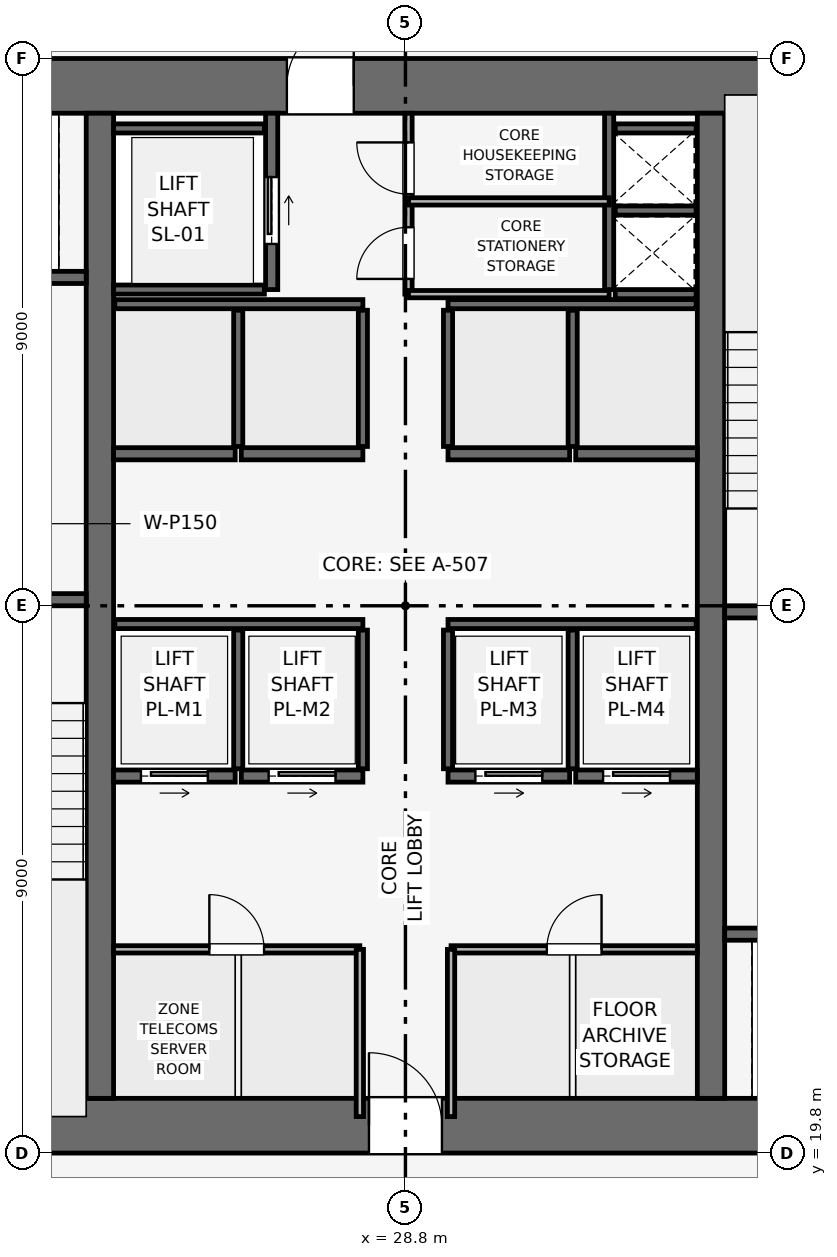
"""IFC4 building model, lengths in metres.
Left out: names, types, materials, properties, quantities, classifications, styles, units other than length and angle.
Written with IfcOpenShell. Run it as: python <this file> out.ifc"""

import sys

from ifc_helpers import new_model, si_unit, direction, frame, frame_2d, origin, place, context, subcontext, project, spatial, rectangle, extrude, element, fill, save


model = new_model("IFC4")
c1 = context("Model", 3, precision=1e-05, world=origin(), true_north=direction((0.0, 1.0)))
c2 = subcontext(c1, "Body", "Model", "MODEL_VIEW")
j1 = project(units=[si_unit("LENGTHUNIT", "METRE"), si_unit("PLANEANGLEUNIT", "RADIAN")], contexts=[c1])
p1 = place(None, origin())
s1 = spatial("IfcSite", under=j1, at=p1, CompositionType="ELEMENT")
p2 = place(p1, origin())
s2 = spatial("IfcBuilding", under=s1, at=p2, CompositionType="ELEMENT")
p3 = place(p2, frame((0.0, 0.0, 153.3)))
s3 = spatial("IfcBuildingStorey", under=s2, at=p3, CompositionType="ELEMENT", Elevation=153.3)
p4 = place(p3, frame((19.8, 20.25, 0.0), z_axis=(0.0, 0.0, 1.0), x_axis=(1.0, 0.0, 0.0)))
e1 = element("IfcWall", 1, at=p4, inside=s3, PredefinedType="SHEAR", context=c2, shape_type="SweptSolid", body=[
    extrude(rectangle(XDim=18.0, YDim=0.9, at=frame_2d((9.0, 0.0))), origin(), (0.0, 0.0, 1.0), 3.75),
])
p5 = place(p4, frame((8.4, 0.0, 0.0)))
e2 = element("IfcOpeningElement", 2, at=p5, cuts=e1, PredefinedType="OPENING", context=c2, shape_type="SweptSolid", body=[
    extrude(rectangle(XDim=1.2, YDim=2.2, at=frame_2d((0.6, 1.1))), frame((0.0, 0.46, 0.0), z_axis=(0.0, -1.0, 0.0), x_axis=(1.0, 0.0, 0.0)), (0.0, 0.0, 1.0), 0.92),
])
p6 = place(p3, frame((19.8, 37.35, 0.0), z_axis=(0.0, 0.0, 1.0), x_axis=(1.0, 0.0, 0.0)))
e3 = element("IfcWall", 3, at=p6, inside=s3, PredefinedType="SHEAR", context=c2, shape_type="SweptSolid", body=[
    extrude(rectangle(XDim=18.0, YDim=0.9, at=frame_2d((9.0, 0.0))), origin(), (0.0, 0.0, 1.0), 3.75),
])
p7 = place(p6, frame((7.05, 0.0, 0.0)))
e4 = element("IfcOpeningElement", 4, at=p7, cuts=e3, PredefinedType="OPENING", context=c2, shape_type="SweptSolid", body=[
    extrude(rectangle(XDim=1.1, YDim=2.15, at=frame_2d((0.55, 1.075))), frame((0.0, 0.46, 0.0), z_axis=(0.0, -1.0, 0.0), x_axis=(1.0, 0.0, 0.0)), (0.0, 0.0, 1.0), 0.92),
])
for number, where, z_axis, x_axis in (
    (5, (23.775, 20.7, 0.0), (0.0, 0.0, 1.0), (0.0, 1.0, 0.0)),
    (6, (33.825, 20.7, 0.0), (0.0, 0.0, 1.0), (0.0, 1.0, 0.0)),
):
    element("IfcWall", number, at=place(p3, frame(where, z_axis=z_axis, x_axis=x_axis)), inside=s3, PredefinedType="SHEAR", context=c2, shape_type="SweptSolid", body=[
        extrude(rectangle(XDim=16.2, YDim=0.45, at=frame_2d((8.1, 0.0))), origin(), (0.0, 0.0, 1.0), 3.75),
    ])
p8 = place(p3, frame((20.4, 28.9, 0.0), z_axis=(0.0, 0.0, 1.0), x_axis=(1.0, 0.0, 0.0)))
e7 = element("IfcWall", 7, at=p8, inside=s3, PredefinedType="SHEAR", context=c2, shape_type="SweptSolid", body=[
    extrude(rectangle(XDim=3.15, YDim=0.2, at=frame_2d((1.575, 0.0))), origin(), (0.0, 0.0, 1.0), 3.495),
])
p9 = place(p8, frame((0.8, 0.0, 0.0)))
e8 = element("IfcOpeningElement", 8, at=p9, cuts=e7, PredefinedType="OPENING", context=c2, shape_type="SweptSolid", body=[
    extrude(rectangle(XDim=1.0, YDim=2.1, at=frame_2d((0.5, 1.05))), frame((0.0, 0.11, 0.0), z_axis=(0.0, -1.0, 0.0), x_axis=(1.0, 0.0, 0.0)), (0.0, 0.0, 1.0), 0.22),
])
p10 = place(p3, frame((34.05, 28.7, 0.0), z_axis=(0.0, 0.0, 1.0), x_axis=(1.0, 0.0, 0.0)))
e9 = element("IfcWall", 9, at=p10, inside=s3, PredefinedType="SHEAR", context=c2, shape_type="SweptSolid", body=[
    extrude(rectangle(XDim=3.15, YDim=0.2, at=frame_2d((1.575, 0.0))), origin(), (0.0, 0.0, 1.0), 3.495),
])
p11 = place(p10, frame((0.8, 0.0, 0.0)))
e10 = element("IfcOpeningElement", 10, at=p11, cuts=e9, PredefinedType="OPENING", context=c2, shape_type="SweptSolid", body=[
    extrude(rectangle(XDim=1.0, YDim=2.1, at=frame_2d((0.5, 1.05))), frame((0.0, 0.11, 0.0), z_axis=(0.0, -1.0, 0.0), x_axis=(1.0, 0.0, 0.0)), (0.0, 0.0, 1.0), 0.22),
])
p12 = place(p3, frame((32.15, 34.0, 0.0), z_axis=(0.0, 0.0, 1.0), x_axis=(0.0, 1.0, 0.0)))
e11 = element("IfcWall", 11, at=p12, inside=s3, PredefinedType="SHEAR", context=c2, shape_type="SweptSolid", body=[
    extrude(rectangle(XDim=2.9, YDim=0.15, at=frame_2d((1.45, 0.0))), origin(), (0.0, 0.0, 1.0), 3.495),
])
for number, where, z_axis, x_axis in (
    (12, (32.25, 33.925, 0.0), (0.0, 0.0, 1.0), (1.0, 0.0, 0.0)),
    (13, (32.25, 35.3, 0.0), (0.0, 0.0, 1.0), (1.0, 0.0, 0.0)),
):
    element("IfcWall", number, at=place(p3, frame(where, z_axis=z_axis, x_axis=x_axis)), inside=s3, PredefinedType="SHEAR", context=c2, shape_type="SweptSolid", body=[
        extrude(rectangle(XDim=1.33, YDim=0.15, at=frame_2d((0.665, 0.0))), origin(), (0.0, 0.0, 1.0), 3.495),
    ])
p13 = place(p3, frame((20.5, 34.2, 0.0), z_axis=(0.0, 0.0, 1.0), x_axis=(1.0, 0.0, 0.0)))
e14 = element("IfcWall", 14, at=p13, inside=s3, PredefinedType="SHEAR", context=c2, shape_type="SweptSolid", body=[
    extrude(rectangle(XDim=3.05, YDim=0.2, at=frame_2d((1.525, 0.0))), origin(), (0.0, 0.0, 1.0), 3.495),
])
p14 = place(p13, frame((0.75, 0.0, 0.0)))
e15 = element("IfcOpeningElement", 15, at=p14, cuts=e14, PredefinedType="OPENING", context=c2, shape_type="SweptSolid", body=[
    extrude(rectangle(XDim=1.1, YDim=2.15, at=frame_2d((0.55, 1.075))), frame((0.0, 0.11, 0.0), z_axis=(0.0, -1.0, 0.0), x_axis=(1.0, 0.0, 0.0)), (0.0, 0.0, 1.0), 0.22),
])
p15 = place(p3, frame((34.05, 23.4, 0.0), z_axis=(0.0, 0.0, 1.0), x_axis=(1.0, 0.0, 0.0)))
e16 = element("IfcWall", 16, at=p15, inside=s3, PredefinedType="SHEAR", context=c2, shape_type="SweptSolid", body=[
    extrude(rectangle(XDim=3.05, YDim=0.2, at=frame_2d((1.525, 0.0))), origin(), (0.0, 0.0, 1.0), 3.495),
])
p16 = place(p15, frame((1.2, 0.0, 0.0)))
e17 = element("IfcOpeningElement", 17, at=p16, cuts=e16, PredefinedType="OPENING", context=c2, shape_type="SweptSolid", body=[
    extrude(rectangle(XDim=1.1, YDim=2.15, at=frame_2d((0.55, 1.075))), frame((0.0, 0.11, 0.0), z_axis=(0.0, -1.0, 0.0), x_axis=(1.0, 0.0, 0.0)), (0.0, 0.0, 1.0), 0.22),
])
p17 = place(p3, frame((26.6, 34.0, 0.0), z_axis=(0.0, 0.0, 1.0), x_axis=(0.0, 1.0, 0.0)))
e18 = element("IfcWall", 18, at=p17, inside=s3, PredefinedType="SHEAR", context=c2, shape_type="SweptSolid", body=[
    extrude(rectangle(XDim=2.9, YDim=0.2, at=frame_2d((1.45, 0.0))), origin(), (0.0, 0.0, 1.0), 3.495),
])
p18 = place(p17, frame((0.75, 0.0, 0.0)))
e19 = element("IfcOpeningElement", 19, at=p18, cuts=e18, PredefinedType="OPENING", context=c2, shape_type="SweptSolid", body=[
    extrude(rectangle(XDim=1.1, YDim=2.15, at=frame_2d((0.55, 1.075))), frame((0.0, 0.11, 0.0), z_axis=(0.0, -1.0, 0.0), x_axis=(1.0, 0.0, 0.0)), (0.0, 0.0, 1.0), 0.22),
])
for number, where, z_axis, x_axis in (
    (20, (24.0, 34.0, 0.0), (0.0, 0.0, 1.0), (1.0, 0.0, 0.0)),
    (21, (24.0, 36.65, 0.0), (0.0, 0.0, 1.0), (1.0, 0.0, 0.0)),
):
    element("IfcWall", number, at=place(p3, frame(where, z_axis=z_axis, x_axis=x_axis)), inside=s3, PredefinedType="SHEAR", context=c2, shape_type="SweptSolid", body=[
        extrude(rectangle(XDim=2.48, YDim=0.15, at=frame_2d((1.24, 0.0))), origin(), (0.0, 0.0, 1.0), 3.495),
    ])
p19 = place(p3, frame((24.0, 26.0, 0.0), z_axis=(0.0, 0.0, 1.0), x_axis=(1.0, 0.0, 0.0)))
e22 = element("IfcWall", 22, at=p19, inside=s3, PredefinedType="SHEAR", context=c2, shape_type="SweptSolid", body=[
    extrude(rectangle(XDim=2.0, YDim=0.2, at=frame_2d((1.0, 0.0))), origin(), (0.0, 0.0, 1.0), 3.495),
])
p20 = place(p19, frame((0.45, 0.0, 0.0)))
e23 = element("IfcOpeningElement", 23, at=p20, cuts=e22, PredefinedType="OPENING", context=c2, shape_type="SweptSolid", body=[
    extrude(rectangle(XDim=1.1, YDim=2.15, at=frame_2d((0.55, 1.075))), frame((0.0, 0.11, 0.0), z_axis=(0.0, -1.0, 0.0), x_axis=(1.0, 0.0, 0.0)), (0.0, 0.0, 1.0), 0.22),
])
p21 = place(p3, frame((26.1, 26.0, 0.0), z_axis=(0.0, 0.0, 1.0), x_axis=(1.0, 0.0, 0.0)))
e24 = element("IfcWall", 24, at=p21, inside=s3, PredefinedType="SHEAR", context=c2, shape_type="SweptSolid", body=[
    extrude(rectangle(XDim=2.0, YDim=0.2, at=frame_2d((1.0, 0.0))), origin(), (0.0, 0.0, 1.0), 3.495),
])
p22 = place(p21, frame((0.45, 0.0, 0.0)))
e25 = element("IfcOpeningElement", 25, at=p22, cuts=e24, PredefinedType="OPENING", context=c2, shape_type="SweptSolid", body=[
    extrude(rectangle(XDim=1.1, YDim=2.15, at=frame_2d((0.55, 1.075))), frame((0.0, 0.11, 0.0), z_axis=(0.0, -1.0, 0.0), x_axis=(1.0, 0.0, 0.0)), (0.0, 0.0, 1.0), 0.22),
])
p23 = place(p3, frame((29.5, 26.0, 0.0), z_axis=(0.0, 0.0, 1.0), x_axis=(1.0, 0.0, 0.0)))
e26 = element("IfcWall", 26, at=p23, inside=s3, PredefinedType="SHEAR", context=c2, shape_type="SweptSolid", body=[
    extrude(rectangle(XDim=2.0, YDim=0.2, at=frame_2d((1.0, 0.0))), origin(), (0.0, 0.0, 1.0), 3.495),
])
p24 = place(p23, frame((0.45, 0.0, 0.0)))
e27 = element("IfcOpeningElement", 27, at=p24, cuts=e26, PredefinedType="OPENING", context=c2, shape_type="SweptSolid", body=[
    extrude(rectangle(XDim=1.1, YDim=2.15, at=frame_2d((0.55, 1.075))), frame((0.0, 0.11, 0.0), z_axis=(0.0, -1.0, 0.0), x_axis=(1.0, 0.0, 0.0)), (0.0, 0.0, 1.0), 0.22),
])
p25 = place(p3, frame((31.6, 26.0, 0.0), z_axis=(0.0, 0.0, 1.0), x_axis=(1.0, 0.0, 0.0)))
e28 = element("IfcWall", 28, at=p25, inside=s3, PredefinedType="SHEAR", context=c2, shape_type="SweptSolid", body=[
    extrude(rectangle(XDim=2.0, YDim=0.2, at=frame_2d((1.0, 0.0))), origin(), (0.0, 0.0, 1.0), 3.495),
])
p26 = place(p25, frame((0.45, 0.0, 0.0)))
e29 = element("IfcOpeningElement", 29, at=p26, cuts=e28, PredefinedType="OPENING", context=c2, shape_type="SweptSolid", body=[
    extrude(rectangle(XDim=1.1, YDim=2.15, at=frame_2d((0.55, 1.075))), frame((0.0, 0.11, 0.0), z_axis=(0.0, -1.0, 0.0), x_axis=(1.0, 0.0, 0.0)), (0.0, 0.0, 1.0), 0.22),
])
for number, where, z_axis, x_axis in (
    (30, (24.0, 31.3, 0.0), (0.0, 0.0, 1.0), (1.0, 0.0, 0.0)),
    (31, (26.1, 31.3, 0.0), (0.0, 0.0, 1.0), (1.0, 0.0, 0.0)),
    (32, (29.5, 31.3, 0.0), (0.0, 0.0, 1.0), (1.0, 0.0, 0.0)),
    (33, (31.6, 31.3, 0.0), (0.0, 0.0, 1.0), (1.0, 0.0, 0.0)),
):
    element("IfcWall", number, at=place(p3, frame(where, z_axis=z_axis, x_axis=x_axis)), inside=s3, PredefinedType="SHEAR", context=c2, shape_type="SweptSolid", body=[
        extrude(rectangle(XDim=2.0, YDim=0.2, at=frame_2d((1.0, 0.0))), origin(), (0.0, 0.0, 1.0), 3.495),
    ])
p27 = place(p3, frame((32.25, 36.65, 0.0), z_axis=(0.0, 0.0, 1.0), x_axis=(1.0, 0.0, 0.0)))
e34 = element("IfcWall", 34, at=p27, inside=s3, PredefinedType="SHEAR", context=c2, shape_type="SweptSolid", body=[
    extrude(rectangle(XDim=1.33, YDim=0.15, at=frame_2d((0.665, 0.0))), origin(), (0.0, 0.0, 1.0), 3.495),
])
for number, where, z_axis, x_axis in (
    (35, (24.02, 28.5, 0.0), (0.0, 0.0, 1.0), (1.0, 0.0, 0.0)),
    (36, (29.5, 28.5, 0.0), (0.0, 0.0, 1.0), (1.0, 0.0, 0.0)),
):
    element("IfcWall", number, at=place(p3, frame(where, z_axis=z_axis, x_axis=x_axis)), inside=s3, PredefinedType="SHEAR", context=c2, shape_type="SweptSolid", body=[
        extrude(rectangle(XDim=4.08, YDim=0.15, at=frame_2d((2.04, 0.0))), origin(), (0.0, 0.0, 1.0), 3.495),
    ])
for number, where, z_axis, x_axis in (
    (37, (26.05, 26.12, 0.0), (0.0, 0.0, 1.0), (0.0, 1.0, 0.0)),
    (38, (28.1, 26.12, 0.0), (0.0, 0.0, 1.0), (0.0, 1.0, 0.0)),
    (39, (29.5, 26.12, 0.0), (0.0, 0.0, 1.0), (0.0, 1.0, 0.0)),
    (40, (31.55, 26.12, 0.0), (0.0, 0.0, 1.0), (0.0, 1.0, 0.0)),
):
    element("IfcWall", number, at=place(p3, frame(where, z_axis=z_axis, x_axis=x_axis)), inside=s3, PredefinedType="SHEAR", context=c2, shape_type="SweptSolid", body=[
        extrude(rectangle(XDim=2.28, YDim=0.15, at=frame_2d((1.14, 0.0))), origin(), (0.0, 0.0, 1.0), 3.495),
    ])
for number, where, z_axis, x_axis in (
    (41, (24.02, 33.76, 0.0), (0.0, 0.0, 1.0), (1.0, 0.0, 0.0)),
    (42, (29.5, 33.76, 0.0), (0.0, 0.0, 1.0), (1.0, 0.0, 0.0)),
):
    element("IfcWall", number, at=place(p3, frame(where, z_axis=z_axis, x_axis=x_axis)), inside=s3, PredefinedType="SHEAR", context=c2, shape_type="SweptSolid", body=[
        extrude(rectangle(XDim=4.08, YDim=0.15, at=frame_2d((2.04, 0.0))), origin(), (0.0, 0.0, 1.0), 3.495),
    ])
for number, where, z_axis, x_axis in (
    (43, (26.05, 31.42, 0.0), (0.0, 0.0, 1.0), (0.0, 1.0, 0.0)),
    (44, (28.1, 31.42, 0.0), (0.0, 0.0, 1.0), (0.0, 1.0, 0.0)),
    (45, (29.5, 31.42, 0.0), (0.0, 0.0, 1.0), (0.0, 1.0, 0.0)),
    (46, (31.55, 31.42, 0.0), (0.0, 0.0, 1.0), (0.0, 1.0, 0.0)),
):
    element("IfcWall", number, at=place(p3, frame(where, z_axis=z_axis, x_axis=x_axis)), inside=s3, PredefinedType="SHEAR", context=c2, shape_type="SweptSolid", body=[
        extrude(rectangle(XDim=2.24, YDim=0.15, at=frame_2d((1.12, 0.0))), origin(), (0.0, 0.0, 1.0), 3.495),
    ])
p28 = place(p3, frame((28.85, 33.925, 0.0), z_axis=(0.0, 0.0, 1.0), x_axis=(0.0, 1.0, 0.0)))
e47 = element("IfcWall", 47, at=p28, inside=s3, PredefinedType="PARTITIONING", context=c2, shape_type="SweptSolid", body=[
    extrude(rectangle(XDim=2.975, YDim=0.12, at=frame_2d((1.487, 0.0))), origin(), (0.0, 0.0, 1.0), 3.495),
])
p29 = place(p28, frame((0.25, 0.0, 0.0)))
e48 = element("IfcOpeningElement", 48, at=p29, cuts=e47, PredefinedType="OPENING", context=c2, shape_type="SweptSolid", body=[
    extrude(rectangle(XDim=0.85, YDim=2.1, at=frame_2d((0.425, 1.05))), frame((0.0, 0.07, 0.0), z_axis=(0.0, -1.0, 0.0), x_axis=(1.0, 0.0, 0.0)), (0.0, 0.0, 1.0), 0.14),
])
p30 = place(p28, frame((1.645, 0.0, 0.0)))
e49 = element("IfcOpeningElement", 49, at=p30, cuts=e47, PredefinedType="OPENING", context=c2, shape_type="SweptSolid", body=[
    extrude(rectangle(XDim=0.85, YDim=2.1, at=frame_2d((0.425, 1.05))), frame((0.0, 0.07, 0.0), z_axis=(0.0, -1.0, 0.0), x_axis=(1.0, 0.0, 0.0)), (0.0, 0.0, 1.0), 0.14),
])
for number, where, z_axis, x_axis in (
    (50, (28.85, 35.45, 0.0), (0.0, 0.0, 1.0), (1.0, 0.0, 0.0)),
    (51, (28.85, 33.925, 0.0), (0.0, 0.0, 1.0), (1.0, 0.0, 0.0)),
):
    element("IfcWall", number, at=place(p3, frame(where, z_axis=z_axis, x_axis=x_axis)), inside=s3, PredefinedType="PARTITIONING", context=c2, shape_type="SweptSolid", body=[
        extrude(rectangle(XDim=3.3, YDim=0.12, at=frame_2d((1.65, 0.0))), origin(), (0.0, 0.0, 1.0), 3.495),
    ])
p31 = place(p3, frame((24.0, 23.15, 0.0), z_axis=(0.0, 0.0, 1.0), x_axis=(1.0, 0.0, 0.0)))
e52 = element("IfcWall", 52, at=p31, inside=s3, PredefinedType="PARTITIONING", context=c2, shape_type="SweptSolid", body=[
    extrude(rectangle(XDim=4.05, YDim=0.12, at=frame_2d((2.025, 0.0))), origin(), (0.0, 0.0, 1.0), 3.495),
])
p32 = place(p31, frame((1.575, 0.0, 0.0)))
e53 = element("IfcOpeningElement", 53, at=p32, cuts=e52, PredefinedType="OPENING", context=c2, shape_type="SweptSolid", body=[
    extrude(rectangle(XDim=0.9, YDim=2.1, at=frame_2d((0.45, 1.05))), frame((0.0, 0.07, 0.0), z_axis=(0.0, -1.0, 0.0), x_axis=(1.0, 0.0, 0.0)), (0.0, 0.0, 1.0), 0.14),
])
p33 = place(p3, frame((28.05, 20.4, 0.0), z_axis=(0.0, 0.0, 1.0), x_axis=(0.0, 1.0, 0.0)))
e54 = element("IfcWall", 54, at=p33, inside=s3, PredefinedType="PARTITIONING", context=c2, shape_type="SweptSolid", body=[
    extrude(rectangle(XDim=2.75, YDim=0.12, at=frame_2d((1.375, 0.0))), origin(), (0.0, 0.0, 1.0), 3.495),
])
p34 = place(p3, frame((29.55, 23.15, 0.0), z_axis=(0.0, 0.0, 1.0), x_axis=(1.0, 0.0, 0.0)))
e55 = element("IfcWall", 55, at=p34, inside=s3, PredefinedType="PARTITIONING", context=c2, shape_type="SweptSolid", body=[
    extrude(rectangle(XDim=4.05, YDim=0.12, at=frame_2d((2.025, 0.0))), origin(), (0.0, 0.0, 1.0), 3.495),
])
p35 = place(p34, frame((1.575, 0.0, 0.0)))
e56 = element("IfcOpeningElement", 56, at=p35, cuts=e55, PredefinedType="OPENING", context=c2, shape_type="SweptSolid", body=[
    extrude(rectangle(XDim=0.9, YDim=2.1, at=frame_2d((0.45, 1.05))), frame((0.0, 0.07, 0.0), z_axis=(0.0, -1.0, 0.0), x_axis=(1.0, 0.0, 0.0)), (0.0, 0.0, 1.0), 0.14),
])
p36 = place(p3, frame((29.55, 20.4, 0.0), z_axis=(0.0, 0.0, 1.0), x_axis=(0.0, 1.0, 0.0)))
e57 = element("IfcWall", 57, at=p36, inside=s3, PredefinedType="PARTITIONING", context=c2, shape_type="SweptSolid", body=[
    extrude(rectangle(XDim=2.75, YDim=0.12, at=frame_2d((1.375, 0.0))), origin(), (0.0, 0.0, 1.0), 3.495),
])
p37 = place(p18, origin())
e58 = element("IfcDoor", 58, at=p37, inside=s3, OperationType="SLIDING_TO_RIGHT", PredefinedType="DOOR", context=c2, shape_type="SweptSolid", body=[
    extrude(rectangle(XDim=1.1, YDim=2.15, at=frame_2d((0.55, 1.075))), frame((0.0, 0.025, 0.0), z_axis=(0.0, -1.0, 0.0), x_axis=(1.0, 0.0, 0.0)), (0.0, 0.0, 1.0), 0.05),
])
fill(e19, e58)
p38 = place(p20, origin())
e59 = element("IfcDoor", 59, at=p38, inside=s3, OperationType="SLIDING_TO_RIGHT", PredefinedType="DOOR", context=c2, shape_type="SweptSolid", body=[
    extrude(rectangle(XDim=1.1, YDim=2.15, at=frame_2d((0.55, 1.075))), frame((0.0, 0.025, 0.0), z_axis=(0.0, -1.0, 0.0), x_axis=(1.0, 0.0, 0.0)), (0.0, 0.0, 1.0), 0.05),
])
fill(e23, e59)
p39 = place(p22, origin())
e60 = element("IfcDoor", 60, at=p39, inside=s3, OperationType="SLIDING_TO_RIGHT", PredefinedType="DOOR", context=c2, shape_type="SweptSolid", body=[
    extrude(rectangle(XDim=1.1, YDim=2.15, at=frame_2d((0.55, 1.075))), frame((0.0, 0.025, 0.0), z_axis=(0.0, -1.0, 0.0), x_axis=(1.0, 0.0, 0.0)), (0.0, 0.0, 1.0), 0.05),
])
fill(e25, e60)
p40 = place(p24, origin())
e61 = element("IfcDoor", 61, at=p40, inside=s3, OperationType="SLIDING_TO_RIGHT", PredefinedType="DOOR", context=c2, shape_type="SweptSolid", body=[
    extrude(rectangle(XDim=1.1, YDim=2.15, at=frame_2d((0.55, 1.075))), frame((0.0, 0.025, 0.0), z_axis=(0.0, -1.0, 0.0), x_axis=(1.0, 0.0, 0.0)), (0.0, 0.0, 1.0), 0.05),
])
fill(e27, e61)
p41 = place(p26, origin())
e62 = element("IfcDoor", 62, at=p41, inside=s3, OperationType="SLIDING_TO_RIGHT", PredefinedType="DOOR", context=c2, shape_type="SweptSolid", body=[
    extrude(rectangle(XDim=1.1, YDim=2.15, at=frame_2d((0.55, 1.075))), frame((0.0, 0.025, 0.0), z_axis=(0.0, -1.0, 0.0), x_axis=(1.0, 0.0, 0.0)), (0.0, 0.0, 1.0), 0.05),
])
fill(e29, e62)
p42 = place(p29, origin())
e63 = element("IfcDoor", 63, at=p42, inside=s3, OperationType="SINGLE_SWING_LEFT", PredefinedType="DOOR", context=c2, shape_type="SweptSolid", body=[
    extrude(rectangle(XDim=0.85, YDim=2.1, at=frame_2d((0.425, 1.05))), frame((0.0, 0.025, 0.0), z_axis=(0.0, -1.0, 0.0), x_axis=(1.0, 0.0, 0.0)), (0.0, 0.0, 1.0), 0.05),
])
fill(e48, e63)
p43 = place(p30, origin())
e64 = element("IfcDoor", 64, at=p43, inside=s3, OperationType="SINGLE_SWING_RIGHT", PredefinedType="DOOR", context=c2, shape_type="SweptSolid", body=[
    extrude(rectangle(XDim=0.85, YDim=2.1, at=frame_2d((0.425, 1.05))), frame((0.0, 0.025, 0.0), z_axis=(0.0, -1.0, 0.0), x_axis=(1.0, 0.0, 0.0)), (0.0, 0.0, 1.0), 0.05),
])
fill(e49, e64)
p44 = place(p32, origin())
e65 = element("IfcDoor", 65, at=p44, inside=s3, OperationType="SINGLE_SWING_LEFT", PredefinedType="DOOR", context=c2, shape_type="SweptSolid", body=[
    extrude(rectangle(XDim=0.9, YDim=2.1, at=frame_2d((0.45, 1.05))), frame((0.0, 0.025, 0.0), z_axis=(0.0, -1.0, 0.0), x_axis=(1.0, 0.0, 0.0)), (0.0, 0.0, 1.0), 0.05),
])
fill(e53, e65)
p45 = place(p35, origin())
e66 = element("IfcDoor", 66, at=p45, inside=s3, OperationType="SINGLE_SWING_RIGHT", PredefinedType="DOOR", context=c2, shape_type="SweptSolid", body=[
    extrude(rectangle(XDim=0.9, YDim=2.1, at=frame_2d((0.45, 1.05))), frame((0.0, 0.025, 0.0), z_axis=(0.0, -1.0, 0.0), x_axis=(1.0, 0.0, 0.0)), (0.0, 0.0, 1.0), 0.05),
])
fill(e56, e66)
p46 = place(p5, origin())
e67 = element("IfcDoor", 67, at=p46, inside=s3, OperationType="SINGLE_SWING_LEFT", PredefinedType="DOOR", context=c2, shape_type="SweptSolid", body=[
    extrude(rectangle(XDim=1.2, YDim=2.2, at=frame_2d((0.6, 1.1))), frame((0.0, 0.025, 0.0), z_axis=(0.0, -1.0, 0.0), x_axis=(1.0, 0.0, 0.0)), (0.0, 0.0, 1.0), 0.05),
])
fill(e2, e67)
p47 = place(p7, origin())
e68 = element("IfcDoor", 68, at=p47, inside=s3, OperationType="SINGLE_SWING_RIGHT", PredefinedType="DOOR", context=c2, shape_type="SweptSolid", body=[
    extrude(rectangle(XDim=1.1, YDim=2.15, at=frame_2d((0.55, 1.075))), frame((0.0, 0.025, 0.0), z_axis=(0.0, -1.0, 0.0), x_axis=(1.0, 0.0, 0.0)), (0.0, 0.0, 1.0), 0.05),
])
fill(e4, e68)
save(model, sys.argv[1])
